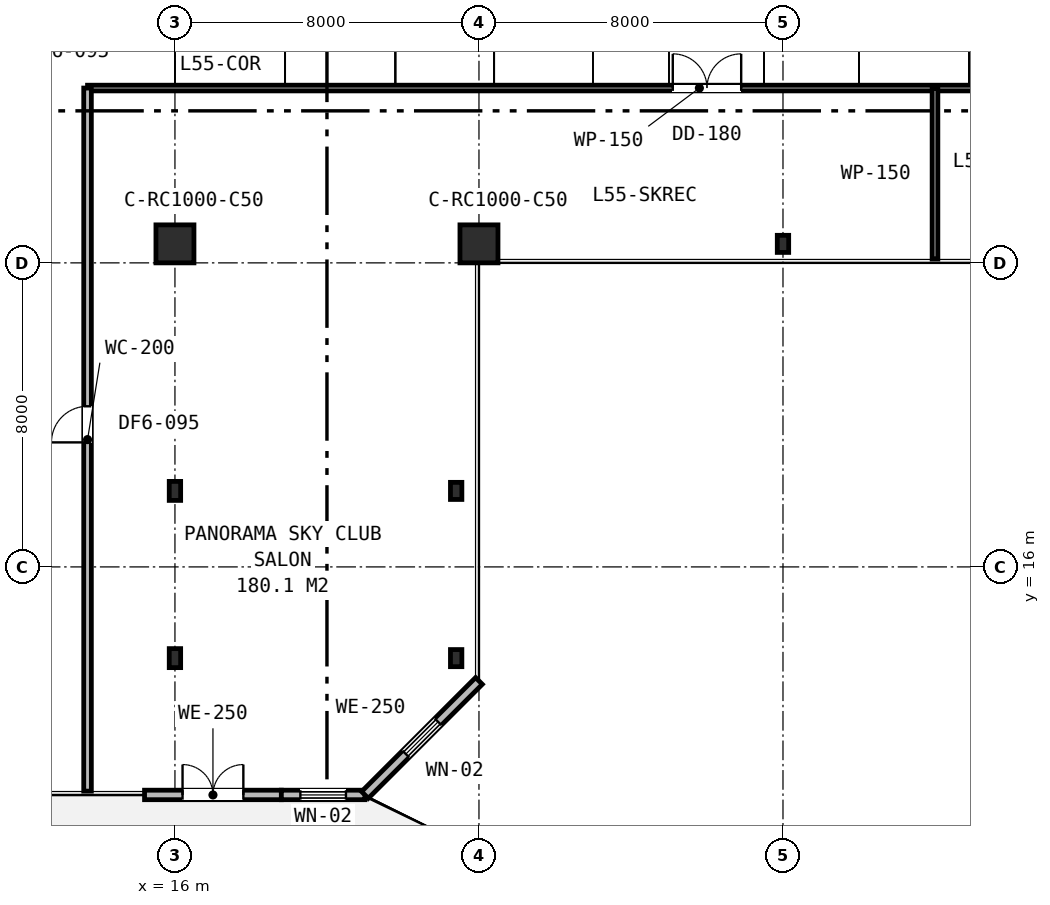
"""IFC4 building model, lengths in metres.
Left out: names, types, materials, properties, quantities, classifications, styles, units other than length and angle.
Written with IfcOpenShell. Run it as: python <this file> out.ifc"""

import sys

from ifc_helpers import new_model, si_unit, direction, frame, frame_2d, origin, origin_2d, place, context, subcontext, project, spatial, rectangle, i_section, extrude, element, fill, save


model = new_model("IFC4")
c1 = context("Model", 3, precision=1e-05, world=origin(), true_north=direction((0.0, 1.0)))
c2 = subcontext(c1, "Body", "Model", "MODEL_VIEW")
j1 = project(units=[si_unit("LENGTHUNIT", "METRE"), si_unit("PLANEANGLEUNIT", "RADIAN")], contexts=[c1])
p1 = place(None, origin())
s1 = spatial("IfcSite", under=j1, at=p1, CompositionType="ELEMENT")
p2 = place(p1, origin())
s2 = spatial("IfcBuilding", under=s1, at=p2, CompositionType="ELEMENT")
p3 = place(p2, frame((0.0, 0.0, 213.0)))
s3 = spatial("IfcBuildingStorey", under=s2, at=p3, CompositionType="ELEMENT", Elevation=213.0)
for number, where, z_axis, x_axis in (
    (1, (16.0, 24.5, 0.0), (0.0, 0.0, 1.0), (1.0, 0.0, 0.0)),
    (2, (24.0, 24.5, 0.0), (0.0, 0.0, 1.0), (1.0, 0.0, 0.0)),
):
    element("IfcColumn", number, at=place(p3, frame(where, z_axis=z_axis, x_axis=x_axis)), inside=s3, PredefinedType="COLUMN", context=c2, shape_type="SweptSolid", body=[
        extrude(rectangle(XDim=1.0, YDim=1.0, at=origin_2d()), origin(), (0.0, 0.0, 1.0), 5.4),
    ])
for number, where, z_axis, x_axis in (
    (3, (32.0, 24.5, 0.0), (0.0, 0.0, 1.0), (1.0, 0.0, 0.0)),
    (4, (23.4, 13.6, 0.0), (0.0, 0.0, 1.0), (1.0, 0.0, 0.0)),
    (5, (23.4, 18.0, 0.0), (0.0, 0.0, 1.0), (1.0, 0.0, 0.0)),
):
    element("IfcColumn", number, at=place(p3, frame(where, z_axis=z_axis, x_axis=x_axis)), inside=s3, PredefinedType="COLUMN", context=c2, shape_type="SweptSolid", body=[
        extrude(i_section(OverallWidth=0.3, OverallDepth=0.45, WebThickness=0.014, FlangeThickness=0.026, FilletRadius=0.027, at=origin_2d()), origin(), (0.0, 0.0, 1.0), 5.4),
    ])
for number, where, z_axis, x_axis in (
    (6, (16.0, 13.6, 0.0), (0.0, 0.0, 1.0), (1.0, 0.0, 0.0)),
    (7, (16.0, 18.0, 0.0), (0.0, 0.0, 1.0), (1.0, 0.0, 0.0)),
):
    element("IfcColumn", number, at=place(p3, frame(where, z_axis=z_axis, x_axis=x_axis)), inside=s3, PredefinedType="COLUMN", context=c2, shape_type="SweptSolid", body=[
        extrude(i_section(OverallWidth=0.3, OverallDepth=0.5, WebThickness=0.015, FlangeThickness=0.028, FilletRadius=0.027, at=origin_2d()), origin(), (0.0, 0.0, 1.0), 5.4),
    ])
p4 = place(p3, frame((15.2, 10.0, 0.0), z_axis=(0.0, 0.0, 1.0), x_axis=(1.0, 0.0, 0.0)))
e8 = element("IfcWall", 8, at=p4, inside=s3, PredefinedType="STANDARD", context=c2, shape_type="SweptSolid", body=[
    extrude(rectangle(XDim=3.6, YDim=0.25, at=frame_2d((1.8, 0.0))), origin(), (0.0, 0.0, 1.0), 5.13),
])
p5 = place(p4, frame((1.0, 0.0, 0.0)))
e9 = element("IfcOpeningElement", 9, at=p5, cuts=e8, PredefinedType="OPENING", context=c2, shape_type="SweptSolid", body=[
    extrude(rectangle(XDim=1.6, YDim=2.2, at=frame_2d((0.8, 1.1))), frame((0.0, 0.135, 0.0), z_axis=(0.0, -1.0, 0.0), x_axis=(1.0, 0.0, 0.0)), (0.0, 0.0, 1.0), 0.27),
])
p6 = place(p3, frame((18.8, 10.0, 0.0), z_axis=(0.0, 0.0, 1.0), x_axis=(1.0, 0.0, 0.0)))
e10 = element("IfcWall", 10, at=p6, inside=s3, PredefinedType="STANDARD", context=c2, shape_type="SweptSolid", body=[
    extrude(rectangle(XDim=2.2, YDim=0.25, at=frame_2d((1.1, 0.0))), origin(), (0.0, 0.0, 1.0), 5.13),
])
p7 = place(p6, frame((0.5, 0.0, 0.85)))
e11 = element("IfcOpeningElement", 11, at=p7, cuts=e10, PredefinedType="OPENING", context=c2, shape_type="SweptSolid", body=[
    extrude(rectangle(XDim=1.2, YDim=1.6, at=frame_2d((0.6, 0.8))), frame((0.0, 0.135, 0.0), z_axis=(0.0, -1.0, 0.0), x_axis=(1.0, 0.0, 0.0)), (0.0, 0.0, 1.0), 0.27),
])
p8 = place(p3, frame((21.0, 10.0, 0.0), z_axis=(0.0, 0.0, 1.0), x_axis=(0.707106781187, 0.707106781187, 0.0)))
e12 = element("IfcWall", 12, at=p8, inside=s3, PredefinedType="STANDARD", context=c2, shape_type="SweptSolid", body=[
    extrude(rectangle(XDim=4.243, YDim=0.25, at=frame_2d((2.121, 0.0))), origin(), (0.0, 0.0, 1.0), 5.13),
])
p9 = place(p8, frame((1.521, 0.0, 0.85)))
e13 = element("IfcOpeningElement", 13, at=p9, cuts=e12, PredefinedType="OPENING", context=c2, shape_type="SweptSolid", body=[
    extrude(rectangle(XDim=1.2, YDim=1.6, at=frame_2d((0.6, 0.8))), frame((0.0, 0.135, 0.0), z_axis=(0.0, -1.0, 0.0), x_axis=(1.0, 0.0, 0.0)), (0.0, 0.0, 1.0), 0.27),
])
p10 = place(p3, frame((13.7, 28.6, 0.0), z_axis=(0.0, 0.0, 1.0), x_axis=(1.0, 0.0, 0.0)))
e14 = element("IfcWall", 14, at=p10, inside=s3, PredefinedType="PARTITIONING", context=c2, shape_type="SweptSolid", body=[
    extrude(rectangle(XDim=32.2, YDim=0.15, at=frame_2d((16.1, 0.0))), origin(), (0.0, 0.0, 1.0), 4.52),
])
p11 = place(p10, frame((15.4, 0.0, 0.0)))
e15 = element("IfcOpeningElement", 15, at=p11, cuts=e14, PredefinedType="OPENING", context=c2, shape_type="SweptSolid", body=[
    extrude(rectangle(XDim=1.8, YDim=2.15, at=frame_2d((0.9, 1.075))), frame((0.0, 0.085, 0.0), z_axis=(0.0, -1.0, 0.0), x_axis=(1.0, 0.0, 0.0)), (0.0, 0.0, 1.0), 0.17),
])
p12 = place(p10, frame((26.3, 0.0, 0.0)))
e16 = element("IfcOpeningElement", 16, at=p12, cuts=e14, PredefinedType="OPENING", context=c2, shape_type="SweptSolid", body=[
    extrude(rectangle(XDim=1.8, YDim=2.15, at=frame_2d((0.9, 1.075))), frame((0.0, 0.085, 0.0), z_axis=(0.0, -1.0, 0.0), x_axis=(1.0, 0.0, 0.0)), (0.0, 0.0, 1.0), 0.17),
])
p13 = place(p3, frame((36.0, 24.1, 0.0), z_axis=(0.0, 0.0, 1.0), x_axis=(0.0, 1.0, 0.0)))
e17 = element("IfcWall", 17, at=p13, inside=s3, PredefinedType="PARTITIONING", context=c2, shape_type="SweptSolid", body=[
    extrude(rectangle(XDim=4.5, YDim=0.15, at=frame_2d((2.25, 0.0))), origin(), (0.0, 0.0, 1.0), 4.84),
])
p14 = place(p3, frame((13.7, 10.1, 0.0), z_axis=(0.0, 0.0, 1.0), x_axis=(0.0, 1.0, 0.0)))
e18 = element("IfcWall", 18, at=p14, inside=s3, PredefinedType="PARTITIONING", context=c2, shape_type="SweptSolid", body=[
    extrude(rectangle(XDim=18.5, YDim=0.2, at=frame_2d((9.25, 0.0))), origin(), (0.0, 0.0, 1.0), 4.52),
])
p15 = place(p14, frame((9.177, 0.0, 0.0)))
e19 = element("IfcOpeningElement", 19, at=p15, cuts=e18, PredefinedType="OPENING", context=c2, shape_type="SweptSolid", body=[
    extrude(rectangle(XDim=0.95, YDim=2.15, at=frame_2d((0.475, 1.075))), frame((0.0, 0.11, 0.0), z_axis=(0.0, -1.0, 0.0), x_axis=(1.0, 0.0, 0.0)), (0.0, 0.0, 1.0), 0.22),
])
p16 = place(p5, origin())
e20 = element("IfcDoor", 20, at=p16, inside=s3, OperationType="DOUBLE_DOOR_SINGLE_SWING", PredefinedType="DOOR", context=c2, shape_type="SweptSolid", body=[
    extrude(rectangle(XDim=1.6, YDim=2.2, at=frame_2d((0.8, 1.1))), frame((0.0, 0.025, 0.0), z_axis=(0.0, -1.0, 0.0), x_axis=(1.0, 0.0, 0.0)), (0.0, 0.0, 1.0), 0.05),
])
fill(e9, e20)
p17 = place(p7, origin())
e21 = element("IfcWindow", 21, at=p17, inside=s3, PartitioningType="SINGLE_PANEL", PredefinedType="WINDOW", context=c2, shape_type="SweptSolid", body=[
    extrude(rectangle(XDim=1.2, YDim=1.6, at=frame_2d((0.6, 0.8))), frame((0.0, 0.03, 0.0), z_axis=(0.0, -1.0, 0.0), x_axis=(1.0, 0.0, 0.0)), (0.0, 0.0, 1.0), 0.06),
])
fill(e11, e21)
p18 = place(p9, origin())
e22 = element("IfcWindow", 22, at=p18, inside=s3, PartitioningType="SINGLE_PANEL", PredefinedType="WINDOW", context=c2, shape_type="SweptSolid", body=[
    extrude(rectangle(XDim=1.2, YDim=1.6, at=frame_2d((0.6, 0.8))), frame((0.0, 0.03, 0.0), z_axis=(0.0, -1.0, 0.0), x_axis=(1.0, 0.0, 0.0)), (0.0, 0.0, 1.0), 0.06),
])
fill(e13, e22)
p19 = place(p11, origin())
e23 = element("IfcDoor", 23, at=p19, inside=s3, OperationType="DOUBLE_DOOR_SINGLE_SWING", PredefinedType="DOOR", context=c2, shape_type="SweptSolid", body=[
    extrude(rectangle(XDim=1.8, YDim=2.15, at=frame_2d((0.9, 1.075))), frame((0.0, 0.025, 0.0), z_axis=(0.0, -1.0, 0.0), x_axis=(1.0, 0.0, 0.0)), (0.0, 0.0, 1.0), 0.05),
])
fill(e15, e23)
p20 = place(p15, origin())
e24 = element("IfcDoor", 24, at=p20, inside=s3, OperationType="SINGLE_SWING_LEFT", PredefinedType="DOOR", context=c2, shape_type="SweptSolid", body=[
    extrude(rectangle(XDim=0.95, YDim=2.15, at=frame_2d((0.475, 1.075))), frame((0.0, 0.025, 0.0), z_axis=(0.0, -1.0, 0.0), x_axis=(1.0, 0.0, 0.0)), (0.0, 0.0, 1.0), 0.05),
])
fill(e19, e24)
save(model, sys.argv[1])
